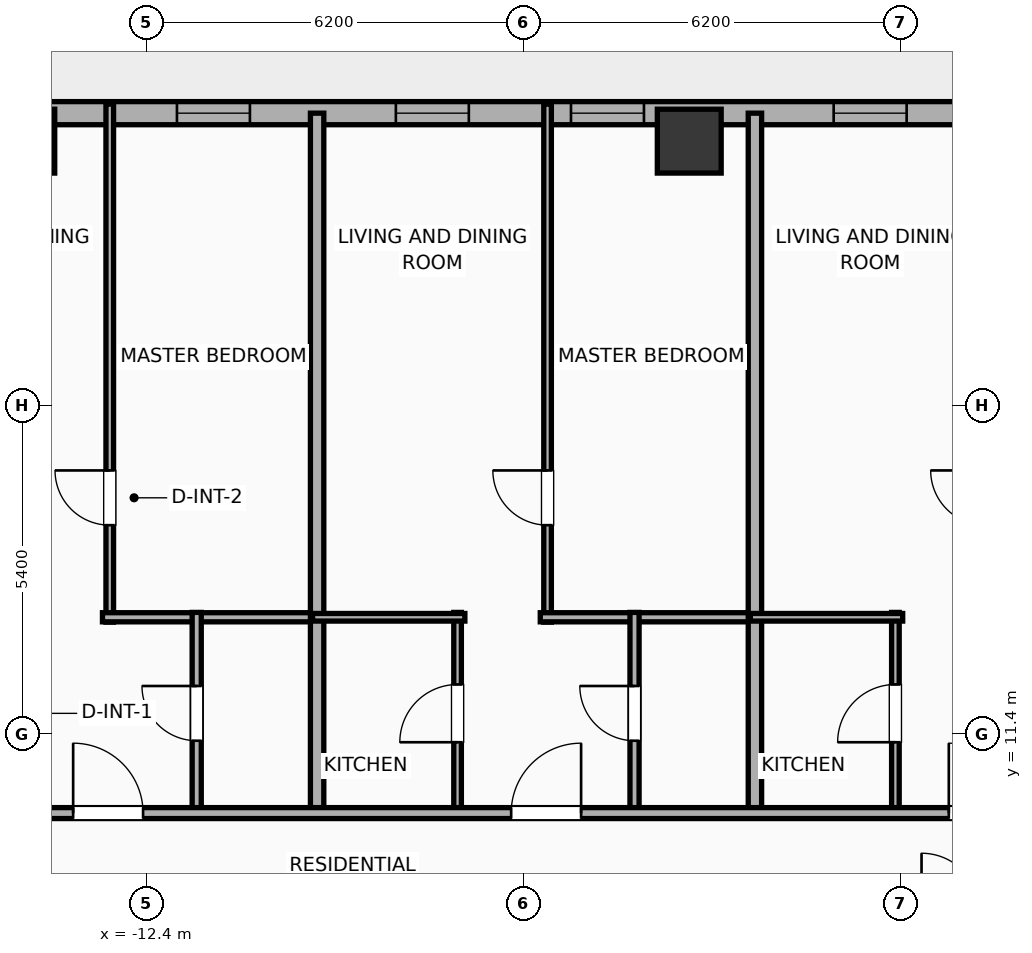
"""IFC4 building model, lengths in metres.
Left out: names, types, materials, properties, quantities, classifications, styles, units other than length and angle.
Written with IfcOpenShell. Run it as: python <this file> out.ifc"""

import sys

from ifc_helpers import new_model, si_unit, direction, frame, frame_2d, origin, origin_2d, place, context, subcontext, project, spatial, rectangle, hollow_rectangle, extrude, element, fill, save


model = new_model("IFC4")
c1 = context("Model", 3, precision=1e-05, world=origin(), true_north=direction((0.0, 1.0)))
c2 = subcontext(c1, "Body", "Model", "MODEL_VIEW")
j1 = project(units=[si_unit("LENGTHUNIT", "METRE"), si_unit("PLANEANGLEUNIT", "RADIAN")], contexts=[c1])
p1 = place(None, origin())
s1 = spatial("IfcSite", under=j1, at=p1, CompositionType="ELEMENT")
p2 = place(p1, origin())
s2 = spatial("IfcBuilding", under=s1, at=p2, CompositionType="ELEMENT")
p3 = place(p2, frame((0.0, 0.0, 113.1)))
s3 = spatial("IfcBuildingStorey", under=s2, at=p3, CompositionType="ELEMENT", Elevation=113.1)
for number, where, z_axis, x_axis in (
    (1, (-3.48, 21.15, 0.0), (0.0, 0.0, 1.0), (1.0, 0.0, 0.0)),
    (2, (-14.44, 21.15, 0.0), (0.0, 0.0, 1.0), (1.0, 0.0, 0.0)),
):
    element("IfcColumn", number, at=place(p3, frame(where, z_axis=z_axis, x_axis=x_axis)), inside=s3, PredefinedType="COLUMN", context=c2, shape_type="SweptSolid", body=[
        extrude(hollow_rectangle(XDim=1.05, YDim=1.05, WallThickness=0.036, at=origin_2d()), origin(), (0.0, 0.0, 1.0), 3.9),
    ])
p4 = place(p3, frame((-25.381, 21.61, 0.0), z_axis=(0.0, 0.0, 1.0), x_axis=(1.0, 0.0, 0.0)))
e3 = element("IfcWall", 3, at=p4, inside=s3, PredefinedType="ELEMENTEDWALL", context=c2, shape_type="SweptSolid", body=[
    extrude(rectangle(XDim=54.763, YDim=0.38, at=frame_2d((27.381, 0.0))), origin(), (0.0, 0.0, 1.0), 3.65),
])
p5 = place(p4, frame((5.645, 0.0, 0.75)))
e4 = element("IfcOpeningElement", 4, at=p5, cuts=e3, PredefinedType="OPENING", context=c2, shape_type="SweptSolid", body=[
    extrude(rectangle(XDim=2.4, YDim=2.1, at=frame_2d((1.2, 1.05))), frame((0.0, 0.2, 0.0), z_axis=(0.0, -1.0, 0.0), x_axis=(1.0, 0.0, 0.0)), (0.0, 0.0, 1.0), 0.4),
])
p6 = place(p4, frame((34.677, 0.0, 0.75)))
e5 = element("IfcOpeningElement", 5, at=p6, cuts=e3, PredefinedType="OPENING", context=c2, shape_type="SweptSolid", body=[
    extrude(rectangle(XDim=2.4, YDim=2.1, at=frame_2d((1.2, 1.05))), frame((0.0, 0.2, 0.0), z_axis=(0.0, -1.0, 0.0), x_axis=(1.0, 0.0, 0.0)), (0.0, 0.0, 1.0), 0.4),
])
p7 = place(p4, frame((45.067, 0.0, 0.75)))
e6 = element("IfcOpeningElement", 6, at=p7, cuts=e3, PredefinedType="OPENING", context=c2, shape_type="SweptSolid", body=[
    extrude(rectangle(XDim=2.4, YDim=2.1, at=frame_2d((1.2, 1.05))), frame((0.0, 0.2, 0.0), z_axis=(0.0, -1.0, 0.0), x_axis=(1.0, 0.0, 0.0)), (0.0, 0.0, 1.0), 0.4),
])
p8 = place(p4, frame((2.938, 0.0, 0.75)))
e7 = element("IfcOpeningElement", 7, at=p8, cuts=e3, PredefinedType="OPENING", context=c2, shape_type="SweptSolid", body=[
    extrude(rectangle(XDim=1.2, YDim=2.05, at=frame_2d((0.6, 1.025))), frame((0.0, 0.2, 0.0), z_axis=(0.0, -1.0, 0.0), x_axis=(1.0, 0.0, 0.0)), (0.0, 0.0, 1.0), 0.4),
])
p9 = place(p4, frame((8.916, 0.0, 0.75)))
e8 = element("IfcOpeningElement", 8, at=p9, cuts=e3, PredefinedType="OPENING", context=c2, shape_type="SweptSolid", body=[
    extrude(rectangle(XDim=1.2, YDim=2.05, at=frame_2d((0.6, 1.025))), frame((0.0, 0.2, 0.0), z_axis=(0.0, -1.0, 0.0), x_axis=(1.0, 0.0, 0.0)), (0.0, 0.0, 1.0), 0.4),
])
p10 = place(p4, frame((13.476, 0.0, 0.75)))
e9 = element("IfcOpeningElement", 9, at=p10, cuts=e3, PredefinedType="OPENING", context=c2, shape_type="SweptSolid", body=[
    extrude(rectangle(XDim=1.2, YDim=2.05, at=frame_2d((0.6, 1.025))), frame((0.0, 0.2, 0.0), z_axis=(0.0, -1.0, 0.0), x_axis=(1.0, 0.0, 0.0)), (0.0, 0.0, 1.0), 0.4),
])
p11 = place(p4, frame((17.076, 0.0, 0.75)))
e10 = element("IfcOpeningElement", 10, at=p11, cuts=e3, PredefinedType="OPENING", context=c2, shape_type="SweptSolid", body=[
    extrude(rectangle(XDim=1.2, YDim=2.05, at=frame_2d((0.6, 1.025))), frame((0.0, 0.2, 0.0), z_axis=(0.0, -1.0, 0.0), x_axis=(1.0, 0.0, 0.0)), (0.0, 0.0, 1.0), 0.4),
])
p12 = place(p4, frame((19.956, 0.0, 0.75)))
e11 = element("IfcOpeningElement", 11, at=p12, cuts=e3, PredefinedType="OPENING", context=c2, shape_type="SweptSolid", body=[
    extrude(rectangle(XDim=1.2, YDim=2.05, at=frame_2d((0.6, 1.025))), frame((0.0, 0.2, 0.0), z_axis=(0.0, -1.0, 0.0), x_axis=(1.0, 0.0, 0.0)), (0.0, 0.0, 1.0), 0.4),
])
p13 = place(p4, frame((24.276, 0.0, 0.75)))
e12 = element("IfcOpeningElement", 12, at=p13, cuts=e3, PredefinedType="OPENING", context=c2, shape_type="SweptSolid", body=[
    extrude(rectangle(XDim=1.2, YDim=2.05, at=frame_2d((0.6, 1.025))), frame((0.0, 0.2, 0.0), z_axis=(0.0, -1.0, 0.0), x_axis=(1.0, 0.0, 0.0)), (0.0, 0.0, 1.0), 0.4),
])
p14 = place(p4, frame((27.876, 0.0, 0.75)))
e13 = element("IfcOpeningElement", 13, at=p14, cuts=e3, PredefinedType="OPENING", context=c2, shape_type="SweptSolid", body=[
    extrude(rectangle(XDim=1.2, YDim=2.05, at=frame_2d((0.6, 1.025))), frame((0.0, 0.2, 0.0), z_axis=(0.0, -1.0, 0.0), x_axis=(1.0, 0.0, 0.0)), (0.0, 0.0, 1.0), 0.4),
])
p15 = place(p4, frame((30.876, 0.0, 0.75)))
e14 = element("IfcOpeningElement", 14, at=p15, cuts=e3, PredefinedType="OPENING", context=c2, shape_type="SweptSolid", body=[
    extrude(rectangle(XDim=1.2, YDim=2.05, at=frame_2d((0.6, 1.025))), frame((0.0, 0.2, 0.0), z_axis=(0.0, -1.0, 0.0), x_axis=(1.0, 0.0, 0.0)), (0.0, 0.0, 1.0), 0.4),
])
p16 = place(p4, frame((38.676, 0.0, 0.75)))
e15 = element("IfcOpeningElement", 15, at=p16, cuts=e3, PredefinedType="OPENING", context=c2, shape_type="SweptSolid", body=[
    extrude(rectangle(XDim=1.2, YDim=2.05, at=frame_2d((0.6, 1.025))), frame((0.0, 0.2, 0.0), z_axis=(0.0, -1.0, 0.0), x_axis=(1.0, 0.0, 0.0)), (0.0, 0.0, 1.0), 0.4),
])
p17 = place(p4, frame((41.796, 0.0, 0.75)))
e16 = element("IfcOpeningElement", 16, at=p17, cuts=e3, PredefinedType="OPENING", context=c2, shape_type="SweptSolid", body=[
    extrude(rectangle(XDim=1.2, YDim=2.05, at=frame_2d((0.6, 1.025))), frame((0.0, 0.2, 0.0), z_axis=(0.0, -1.0, 0.0), x_axis=(1.0, 0.0, 0.0)), (0.0, 0.0, 1.0), 0.4),
])
p18 = place(p4, frame((49.476, 0.0, 0.75)))
e17 = element("IfcOpeningElement", 17, at=p18, cuts=e3, PredefinedType="OPENING", context=c2, shape_type="SweptSolid", body=[
    extrude(rectangle(XDim=1.2, YDim=2.05, at=frame_2d((0.6, 1.025))), frame((0.0, 0.2, 0.0), z_axis=(0.0, -1.0, 0.0), x_axis=(1.0, 0.0, 0.0)), (0.0, 0.0, 1.0), 0.4),
])
p19 = place(p4, frame((52.227, 0.0, 0.75)))
e18 = element("IfcOpeningElement", 18, at=p19, cuts=e3, PredefinedType="OPENING", context=c2, shape_type="SweptSolid", body=[
    extrude(rectangle(XDim=1.2, YDim=2.05, at=frame_2d((0.6, 1.025))), frame((0.0, 0.2, 0.0), z_axis=(0.0, -1.0, 0.0), x_axis=(1.0, 0.0, 0.0)), (0.0, 0.0, 1.0), 0.4),
])
p20 = place(p3, frame((-13.01, 13.24, 0.0), z_axis=(0.0, 0.0, 1.0), x_axis=(0.0, 1.0, 0.0)))
e19 = element("IfcWall", 19, at=p20, inside=s3, PredefinedType="PARTITIONING", context=c2, shape_type="SweptSolid", body=[
    extrude(rectangle(XDim=8.52, YDim=0.125, at=frame_2d((4.26, 0.0))), origin(), (0.0, 0.0, 1.0), 3.65),
])
p21 = place(p20, frame((1.595, 0.0, 0.0)))
e20 = element("IfcOpeningElement", 20, at=p21, cuts=e19, PredefinedType="OPENING", context=c2, shape_type="SweptSolid", body=[
    extrude(rectangle(XDim=0.9, YDim=2.05, at=frame_2d((0.45, 1.025))), frame((0.0, 0.073, 0.0), z_axis=(0.0, -1.0, 0.0), x_axis=(1.0, 0.0, 0.0)), (0.0, 0.0, 1.0), 0.145),
])
p22 = place(p3, frame((-13.13, 13.32, 0.0), z_axis=(0.0, 0.0, 1.0), x_axis=(1.0, 0.0, 0.0)))
e21 = element("IfcWall", 21, at=p22, inside=s3, PredefinedType="PLUMBINGWALL", context=c2, shape_type="SweptSolid", body=[
    extrude(rectangle(XDim=3.605, YDim=0.15, at=frame_2d((1.802, 0.0))), origin(), (0.0, 0.0, 1.0), 3.65),
])
p23 = place(p3, frame((-11.58, 10.08, 0.0), z_axis=(0.0, 0.0, 1.0), x_axis=(0.0, 1.0, 0.0)))
e22 = element("IfcWall", 22, at=p23, inside=s3, PredefinedType="PLUMBINGWALL", context=c2, shape_type="SweptSolid", body=[
    extrude(rectangle(XDim=3.32, YDim=0.15, at=frame_2d((1.66, 0.0))), origin(), (0.0, 0.0, 1.0), 3.65),
])
p24 = place(p23, frame((1.21, 0.0, 0.0)))
e23 = element("IfcOpeningElement", 23, at=p24, cuts=e22, PredefinedType="OPENING", context=c2, shape_type="SweptSolid", body=[
    extrude(rectangle(XDim=0.9, YDim=2.05, at=frame_2d((0.45, 1.025))), frame((0.0, 0.085, 0.0), z_axis=(0.0, -1.0, 0.0), x_axis=(1.0, 0.0, 0.0)), (0.0, 0.0, 1.0), 0.17),
])
p25 = place(p3, frame((-9.6, 10.02, 0.0), z_axis=(0.0, 0.0, 1.0), x_axis=(0.0, 1.0, 0.0)))
e24 = element("IfcWall", 24, at=p25, inside=s3, PredefinedType="PARTITIONING", context=c2, shape_type="SweptSolid", body=[
    extrude(rectangle(XDim=11.59, YDim=0.22, at=frame_2d((5.795, 0.0))), origin(), (0.0, 0.0, 1.0), 3.65),
])
p26 = place(p3, frame((-5.81, 13.24, 0.0), z_axis=(0.0, 0.0, 1.0), x_axis=(0.0, 1.0, 0.0)))
e25 = element("IfcWall", 25, at=p26, inside=s3, PredefinedType="PARTITIONING", context=c2, shape_type="SweptSolid", body=[
    extrude(rectangle(XDim=8.52, YDim=0.125, at=frame_2d((4.26, 0.0))), origin(), (0.0, 0.0, 1.0), 3.65),
])
p27 = place(p26, frame((1.595, 0.0, 0.0)))
e26 = element("IfcOpeningElement", 26, at=p27, cuts=e25, PredefinedType="OPENING", context=c2, shape_type="SweptSolid", body=[
    extrude(rectangle(XDim=0.9, YDim=2.05, at=frame_2d((0.45, 1.025))), frame((0.0, 0.073, 0.0), z_axis=(0.0, -1.0, 0.0), x_axis=(1.0, 0.0, 0.0)), (0.0, 0.0, 1.0), 0.145),
])
p28 = place(p3, frame((-5.93, 13.32, 0.0), z_axis=(0.0, 0.0, 1.0), x_axis=(1.0, 0.0, 0.0)))
e27 = element("IfcWall", 27, at=p28, inside=s3, PredefinedType="PLUMBINGWALL", context=c2, shape_type="SweptSolid", body=[
    extrude(rectangle(XDim=3.605, YDim=0.15, at=frame_2d((1.802, 0.0))), origin(), (0.0, 0.0, 1.0), 3.65),
])
p29 = place(p3, frame((-7.29, 10.08, 0.0), z_axis=(0.0, 0.0, 1.0), x_axis=(0.0, 1.0, 0.0)))
e28 = element("IfcWall", 28, at=p29, inside=s3, PredefinedType="PARTITIONING", context=c2, shape_type="SweptSolid", body=[
    extrude(rectangle(XDim=3.32, YDim=0.125, at=frame_2d((1.66, 0.0))), origin(), (0.0, 0.0, 1.0), 3.65),
])
p30 = place(p29, frame((1.185, 0.0, 0.0)))
e29 = element("IfcOpeningElement", 29, at=p30, cuts=e28, PredefinedType="OPENING", context=c2, shape_type="SweptSolid", body=[
    extrude(rectangle(XDim=0.95, YDim=2.05, at=frame_2d((0.475, 1.025))), frame((0.0, 0.073, 0.0), z_axis=(0.0, -1.0, 0.0), x_axis=(1.0, 0.0, 0.0)), (0.0, 0.0, 1.0), 0.145),
])
p31 = place(p3, frame((-9.675, 13.32, 0.0), z_axis=(0.0, 0.0, 1.0), x_axis=(1.0, 0.0, 0.0)))
e30 = element("IfcWall", 30, at=p31, inside=s3, PredefinedType="PARTITIONING", context=c2, shape_type="SweptSolid", body=[
    extrude(rectangle(XDim=2.505, YDim=0.125, at=frame_2d((1.252, 0.0))), origin(), (0.0, 0.0, 1.0), 3.65),
])
p32 = place(p3, frame((-4.38, 10.08, 0.0), z_axis=(0.0, 0.0, 1.0), x_axis=(0.0, 1.0, 0.0)))
e31 = element("IfcWall", 31, at=p32, inside=s3, PredefinedType="PLUMBINGWALL", context=c2, shape_type="SweptSolid", body=[
    extrude(rectangle(XDim=3.32, YDim=0.15, at=frame_2d((1.66, 0.0))), origin(), (0.0, 0.0, 1.0), 3.65),
])
p33 = place(p32, frame((1.21, 0.0, 0.0)))
e32 = element("IfcOpeningElement", 32, at=p33, cuts=e31, PredefinedType="OPENING", context=c2, shape_type="SweptSolid", body=[
    extrude(rectangle(XDim=0.9, YDim=2.05, at=frame_2d((0.45, 1.025))), frame((0.0, 0.085, 0.0), z_axis=(0.0, -1.0, 0.0), x_axis=(1.0, 0.0, 0.0)), (0.0, 0.0, 1.0), 0.17),
])
p34 = place(p3, frame((-2.4, 10.02, 0.0), z_axis=(0.0, 0.0, 1.0), x_axis=(0.0, 1.0, 0.0)))
e33 = element("IfcWall", 33, at=p34, inside=s3, PredefinedType="PARTITIONING", context=c2, shape_type="SweptSolid", body=[
    extrude(rectangle(XDim=11.59, YDim=0.22, at=frame_2d((5.795, 0.0))), origin(), (0.0, 0.0, 1.0), 3.65),
])
p35 = place(p3, frame((-0.09, 10.08, 0.0), z_axis=(0.0, 0.0, 1.0), x_axis=(0.0, 1.0, 0.0)))
e34 = element("IfcWall", 34, at=p35, inside=s3, PredefinedType="PARTITIONING", context=c2, shape_type="SweptSolid", body=[
    extrude(rectangle(XDim=3.32, YDim=0.125, at=frame_2d((1.66, 0.0))), origin(), (0.0, 0.0, 1.0), 3.65),
])
p36 = place(p35, frame((1.185, 0.0, 0.0)))
e35 = element("IfcOpeningElement", 35, at=p36, cuts=e34, PredefinedType="OPENING", context=c2, shape_type="SweptSolid", body=[
    extrude(rectangle(XDim=0.95, YDim=2.05, at=frame_2d((0.475, 1.025))), frame((0.0, 0.073, 0.0), z_axis=(0.0, -1.0, 0.0), x_axis=(1.0, 0.0, 0.0)), (0.0, 0.0, 1.0), 0.145),
])
p37 = place(p3, frame((-2.475, 13.32, 0.0), z_axis=(0.0, 0.0, 1.0), x_axis=(1.0, 0.0, 0.0)))
e36 = element("IfcWall", 36, at=p37, inside=s3, PredefinedType="PARTITIONING", context=c2, shape_type="SweptSolid", body=[
    extrude(rectangle(XDim=2.505, YDim=0.125, at=frame_2d((1.252, 0.0))), origin(), (0.0, 0.0, 1.0), 3.65),
])
p38 = place(p3, frame((-29.21, 10.1, 0.0), z_axis=(0.0, 0.0, 1.0), x_axis=(1.0, 0.0, 0.0)))
e37 = element("IfcWall", 37, at=p38, inside=s3, PredefinedType="PARTITIONING", context=c2, shape_type="SweptSolid", body=[
    extrude(rectangle(XDim=62.42, YDim=0.18, at=frame_2d((31.21, 0.0))), origin(), (0.0, 0.0, 1.0), 3.65),
])
p39 = place(p38, frame((2.74, 0.0, 0.0)))
e38 = element("IfcOpeningElement", 38, at=p39, cuts=e37, PredefinedType="OPENING", context=c2, shape_type="SweptSolid", body=[
    extrude(rectangle(XDim=0.9, YDim=2.05, at=frame_2d((0.45, 1.025))), frame((0.0, 0.1, 0.0), z_axis=(0.0, -1.0, 0.0), x_axis=(1.0, 0.0, 0.0)), (0.0, 0.0, 1.0), 0.2),
])
p40 = place(p38, frame((9.868, 0.0, 0.0)))
e39 = element("IfcOpeningElement", 39, at=p40, cuts=e37, PredefinedType="OPENING", context=c2, shape_type="SweptSolid", body=[
    extrude(rectangle(XDim=1.15, YDim=2.05, at=frame_2d((0.575, 1.025))), frame((0.0, 0.1, 0.0), z_axis=(0.0, -1.0, 0.0), x_axis=(1.0, 0.0, 0.0)), (0.0, 0.0, 1.0), 0.2),
])
p41 = place(p38, frame((15.598, 0.0, 0.0)))
e40 = element("IfcOpeningElement", 40, at=p41, cuts=e37, PredefinedType="OPENING", context=c2, shape_type="SweptSolid", body=[
    extrude(rectangle(XDim=1.15, YDim=2.05, at=frame_2d((0.575, 1.025))), frame((0.0, 0.1, 0.0), z_axis=(0.0, -1.0, 0.0), x_axis=(1.0, 0.0, 0.0)), (0.0, 0.0, 1.0), 0.2),
])
p42 = place(p38, frame((22.801, 0.0, 0.0)))
e41 = element("IfcOpeningElement", 41, at=p42, cuts=e37, PredefinedType="OPENING", context=c2, shape_type="SweptSolid", body=[
    extrude(rectangle(XDim=1.15, YDim=2.05, at=frame_2d((0.575, 1.025))), frame((0.0, 0.1, 0.0), z_axis=(0.0, -1.0, 0.0), x_axis=(1.0, 0.0, 0.0)), (0.0, 0.0, 1.0), 0.2),
])
p43 = place(p38, frame((29.998, 0.0, 0.0)))
e42 = element("IfcOpeningElement", 42, at=p43, cuts=e37, PredefinedType="OPENING", context=c2, shape_type="SweptSolid", body=[
    extrude(rectangle(XDim=1.15, YDim=2.05, at=frame_2d((0.575, 1.025))), frame((0.0, 0.1, 0.0), z_axis=(0.0, -1.0, 0.0), x_axis=(1.0, 0.0, 0.0)), (0.0, 0.0, 1.0), 0.2),
])
p44 = place(p38, frame((37.202, 0.0, 0.0)))
e43 = element("IfcOpeningElement", 43, at=p44, cuts=e37, PredefinedType="OPENING", context=c2, shape_type="SweptSolid", body=[
    extrude(rectangle(XDim=1.15, YDim=2.05, at=frame_2d((0.575, 1.025))), frame((0.0, 0.1, 0.0), z_axis=(0.0, -1.0, 0.0), x_axis=(1.0, 0.0, 0.0)), (0.0, 0.0, 1.0), 0.2),
])
p45 = place(p38, frame((44.399, 0.0, 0.0)))
e44 = element("IfcOpeningElement", 44, at=p45, cuts=e37, PredefinedType="OPENING", context=c2, shape_type="SweptSolid", body=[
    extrude(rectangle(XDim=1.15, YDim=2.05, at=frame_2d((0.575, 1.025))), frame((0.0, 0.1, 0.0), z_axis=(0.0, -1.0, 0.0), x_axis=(1.0, 0.0, 0.0)), (0.0, 0.0, 1.0), 0.2),
])
p46 = place(p38, frame((51.602, 0.0, 0.0)))
e45 = element("IfcOpeningElement", 45, at=p46, cuts=e37, PredefinedType="OPENING", context=c2, shape_type="SweptSolid", body=[
    extrude(rectangle(XDim=1.15, YDim=2.05, at=frame_2d((0.575, 1.025))), frame((0.0, 0.1, 0.0), z_axis=(0.0, -1.0, 0.0), x_axis=(1.0, 0.0, 0.0)), (0.0, 0.0, 1.0), 0.2),
])
p47 = place(p38, frame((58.762, 0.0, 0.0)))
e46 = element("IfcOpeningElement", 46, at=p47, cuts=e37, PredefinedType="OPENING", context=c2, shape_type="SweptSolid", body=[
    extrude(rectangle(XDim=0.9, YDim=2.05, at=frame_2d((0.45, 1.025))), frame((0.0, 0.1, 0.0), z_axis=(0.0, -1.0, 0.0), x_axis=(1.0, 0.0, 0.0)), (0.0, 0.0, 1.0), 0.2),
])
p48 = place(p10, origin())
e47 = element("IfcWindow", 47, at=p48, inside=s3, PartitioningType="SINGLE_PANEL", PredefinedType="WINDOW", context=c2, shape_type="SweptSolid", body=[
    extrude(rectangle(XDim=1.2, YDim=2.05, at=frame_2d((0.6, 1.025))), frame((0.0, 0.03, 0.0), z_axis=(0.0, -1.0, 0.0), x_axis=(1.0, 0.0, 0.0)), (0.0, 0.0, 1.0), 0.06),
])
fill(e9, e47)
p49 = place(p11, origin())
e48 = element("IfcWindow", 48, at=p49, inside=s3, PartitioningType="SINGLE_PANEL", PredefinedType="WINDOW", context=c2, shape_type="SweptSolid", body=[
    extrude(rectangle(XDim=1.2, YDim=2.05, at=frame_2d((0.6, 1.025))), frame((0.0, 0.03, 0.0), z_axis=(0.0, -1.0, 0.0), x_axis=(1.0, 0.0, 0.0)), (0.0, 0.0, 1.0), 0.06),
])
fill(e10, e48)
p50 = place(p12, origin())
e49 = element("IfcWindow", 49, at=p50, inside=s3, PartitioningType="SINGLE_PANEL", PredefinedType="WINDOW", context=c2, shape_type="SweptSolid", body=[
    extrude(rectangle(XDim=1.2, YDim=2.05, at=frame_2d((0.6, 1.025))), frame((0.0, 0.03, 0.0), z_axis=(0.0, -1.0, 0.0), x_axis=(1.0, 0.0, 0.0)), (0.0, 0.0, 1.0), 0.06),
])
fill(e11, e49)
p51 = place(p13, origin())
e50 = element("IfcWindow", 50, at=p51, inside=s3, PartitioningType="SINGLE_PANEL", PredefinedType="WINDOW", context=c2, shape_type="SweptSolid", body=[
    extrude(rectangle(XDim=1.2, YDim=2.05, at=frame_2d((0.6, 1.025))), frame((0.0, 0.03, 0.0), z_axis=(0.0, -1.0, 0.0), x_axis=(1.0, 0.0, 0.0)), (0.0, 0.0, 1.0), 0.06),
])
fill(e12, e50)
p52 = place(p21, origin())
e51 = element("IfcDoor", 51, at=p52, inside=s3, OperationType="SINGLE_SWING_RIGHT", PredefinedType="DOOR", context=c2, shape_type="SweptSolid", body=[
    extrude(rectangle(XDim=0.9, YDim=2.05, at=frame_2d((0.45, 1.025))), frame((0.0, 0.025, 0.0), z_axis=(0.0, -1.0, 0.0), x_axis=(1.0, 0.0, 0.0)), (0.0, 0.0, 1.0), 0.05),
])
fill(e20, e51)
p53 = place(p24, origin())
e52 = element("IfcDoor", 52, at=p53, inside=s3, OperationType="SINGLE_SWING_RIGHT", PredefinedType="DOOR", context=c2, shape_type="SweptSolid", body=[
    extrude(rectangle(XDim=0.9, YDim=2.05, at=frame_2d((0.45, 1.025))), frame((0.0, 0.025, 0.0), z_axis=(0.0, -1.0, 0.0), x_axis=(1.0, 0.0, 0.0)), (0.0, 0.0, 1.0), 0.05),
])
fill(e23, e52)
p54 = place(p27, origin())
e53 = element("IfcDoor", 53, at=p54, inside=s3, OperationType="SINGLE_SWING_RIGHT", PredefinedType="DOOR", context=c2, shape_type="SweptSolid", body=[
    extrude(rectangle(XDim=0.9, YDim=2.05, at=frame_2d((0.45, 1.025))), frame((0.0, 0.025, 0.0), z_axis=(0.0, -1.0, 0.0), x_axis=(1.0, 0.0, 0.0)), (0.0, 0.0, 1.0), 0.05),
])
fill(e26, e53)
p55 = place(p30, origin())
e54 = element("IfcDoor", 54, at=p55, inside=s3, OperationType="SINGLE_SWING_LEFT", PredefinedType="DOOR", context=c2, shape_type="SweptSolid", body=[
    extrude(rectangle(XDim=0.95, YDim=2.05, at=frame_2d((0.475, 1.025))), frame((0.0, 0.025, 0.0), z_axis=(0.0, -1.0, 0.0), x_axis=(1.0, 0.0, 0.0)), (0.0, 0.0, 1.0), 0.05),
])
fill(e29, e54)
p56 = place(p33, origin())
e55 = element("IfcDoor", 55, at=p56, inside=s3, OperationType="SINGLE_SWING_RIGHT", PredefinedType="DOOR", context=c2, shape_type="SweptSolid", body=[
    extrude(rectangle(XDim=0.9, YDim=2.05, at=frame_2d((0.45, 1.025))), frame((0.0, 0.025, 0.0), z_axis=(0.0, -1.0, 0.0), x_axis=(1.0, 0.0, 0.0)), (0.0, 0.0, 1.0), 0.05),
])
fill(e32, e55)
p57 = place(p36, origin())
e56 = element("IfcDoor", 56, at=p57, inside=s3, OperationType="SINGLE_SWING_LEFT", PredefinedType="DOOR", context=c2, shape_type="SweptSolid", body=[
    extrude(rectangle(XDim=0.95, YDim=2.05, at=frame_2d((0.475, 1.025))), frame((0.0, 0.025, 0.0), z_axis=(0.0, -1.0, 0.0), x_axis=(1.0, 0.0, 0.0)), (0.0, 0.0, 1.0), 0.05),
])
fill(e35, e56)
p58 = place(p41, origin())
e57 = element("IfcDoor", 57, at=p58, inside=s3, OperationType="SINGLE_SWING_LEFT", PredefinedType="DOOR", context=c2, shape_type="SweptSolid", body=[
    extrude(rectangle(XDim=1.15, YDim=2.05, at=frame_2d((0.575, 1.025))), frame((0.0, 0.025, 0.0), z_axis=(0.0, -1.0, 0.0), x_axis=(1.0, 0.0, 0.0)), (0.0, 0.0, 1.0), 0.05),
])
fill(e40, e57)
p59 = place(p42, origin())
e58 = element("IfcDoor", 58, at=p59, inside=s3, OperationType="SINGLE_SWING_RIGHT", PredefinedType="DOOR", context=c2, shape_type="SweptSolid", body=[
    extrude(rectangle(XDim=1.15, YDim=2.05, at=frame_2d((0.575, 1.025))), frame((0.0, 0.025, 0.0), z_axis=(0.0, -1.0, 0.0), x_axis=(1.0, 0.0, 0.0)), (0.0, 0.0, 1.0), 0.05),
])
fill(e41, e58)
p60 = place(p43, origin())
e59 = element("IfcDoor", 59, at=p60, inside=s3, OperationType="SINGLE_SWING_LEFT", PredefinedType="DOOR", context=c2, shape_type="SweptSolid", body=[
    extrude(rectangle(XDim=1.15, YDim=2.05, at=frame_2d((0.575, 1.025))), frame((0.0, 0.025, 0.0), z_axis=(0.0, -1.0, 0.0), x_axis=(1.0, 0.0, 0.0)), (0.0, 0.0, 1.0), 0.05),
])
fill(e42, e59)
save(model, sys.argv[1])
